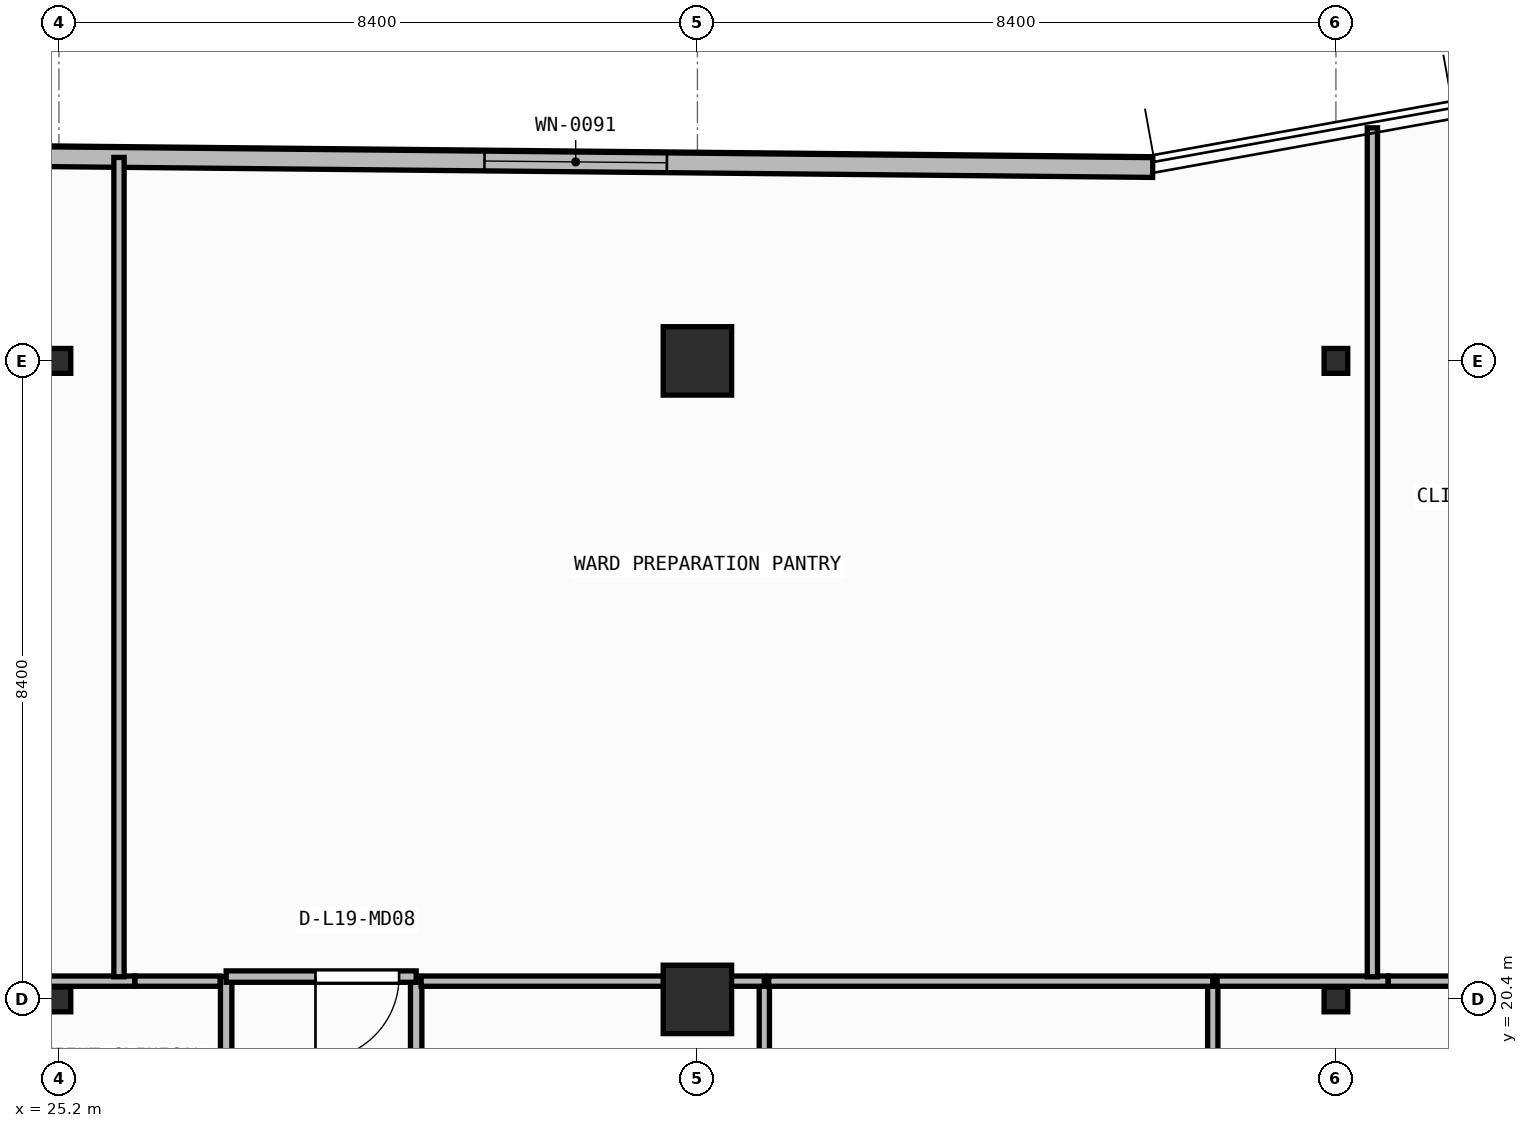
"""IFC4 building model, lengths in metres.
Left out: names, types, materials, properties, quantities, classifications, styles, units other than length and angle.
Written with IfcOpenShell. Run it as: python <this file> out.ifc"""

import sys

from ifc_helpers import new_model, si_unit, direction, frame, frame_2d, origin, origin_2d, place, context, subcontext, project, spatial, rectangle, i_section, extrude, element, fill, save


model = new_model("IFC4")
c1 = context("Model", 3, precision=1e-05, world=origin(), true_north=direction((0.0, 1.0)))
c2 = subcontext(c1, "Body", "Model", "MODEL_VIEW")
j1 = project(units=[si_unit("LENGTHUNIT", "METRE"), si_unit("PLANEANGLEUNIT", "RADIAN")], contexts=[c1])
p1 = place(None, origin())
s1 = spatial("IfcSite", under=j1, at=p1, CompositionType="ELEMENT")
p2 = place(p1, origin())
s2 = spatial("IfcBuilding", under=s1, at=p2, CompositionType="ELEMENT")
p3 = place(p2, frame((0.0, 0.0, 77.8)))
s3 = spatial("IfcBuildingStorey", under=s2, at=p3, CompositionType="ELEMENT", Elevation=77.8)
p4 = place(p3, frame((25.2, 20.4, 0.0), z_axis=(0.0, 0.0, 1.0), x_axis=(1.0, 0.0, 0.0)))
e1 = element("IfcColumn", 1, at=p4, inside=s3, PredefinedType="COLUMN", context=c2, shape_type="SweptSolid", body=[
    extrude(i_section(OverallWidth=0.311, OverallDepth=0.327, WebThickness=0.016, FlangeThickness=0.025, FilletRadius=0.017, at=origin_2d()), origin(), (0.0, 0.0, 1.0), 3.95),
])
p5 = place(p3, frame((33.6, 20.4, 0.0), z_axis=(0.0, 0.0, 1.0), x_axis=(1.0, 0.0, 0.0)))
e2 = element("IfcColumn", 2, at=p5, inside=s3, PredefinedType="COLUMN", context=c2, shape_type="SweptSolid", body=[
    extrude(rectangle(XDim=0.9, YDim=0.9, at=origin_2d()), origin(), (0.0, 0.0, 1.0), 3.95),
])
for number, where, z_axis, x_axis in (
    (3, (42.0, 20.4, 0.0), (0.0, 0.0, 1.0), (1.0, 0.0, 0.0)),
    (4, (25.2, 28.8, 0.0), (0.0, 0.0, 1.0), (1.0, 0.0, 0.0)),
):
    element("IfcColumn", number, at=place(p3, frame(where, z_axis=z_axis, x_axis=x_axis)), inside=s3, PredefinedType="COLUMN", context=c2, shape_type="SweptSolid", body=[
        extrude(i_section(OverallWidth=0.311, OverallDepth=0.327, WebThickness=0.016, FlangeThickness=0.025, FilletRadius=0.017, at=origin_2d()), origin(), (0.0, 0.0, 1.0), 3.95),
    ])
p6 = place(p3, frame((33.6, 28.8, 0.0), z_axis=(0.0, 0.0, 1.0), x_axis=(1.0, 0.0, 0.0)))
e5 = element("IfcColumn", 5, at=p6, inside=s3, PredefinedType="COLUMN", context=c2, shape_type="SweptSolid", body=[
    extrude(rectangle(XDim=0.9, YDim=0.9, at=origin_2d()), origin(), (0.0, 0.0, 1.0), 3.95),
])
p7 = place(p3, frame((42.0, 28.8, 0.0), z_axis=(0.0, 0.0, 1.0), x_axis=(1.0, 0.0, 0.0)))
e6 = element("IfcColumn", 6, at=p7, inside=s3, PredefinedType="COLUMN", context=c2, shape_type="SweptSolid", body=[
    extrude(i_section(OverallWidth=0.311, OverallDepth=0.327, WebThickness=0.016, FlangeThickness=0.025, FilletRadius=0.017, at=origin_2d()), origin(), (0.0, 0.0, 1.0), 3.95),
])
p8 = place(p3, frame((39.59, 31.344, 0.0), z_axis=(0.0, 0.0, 1.0), x_axis=(-0.999952362926, 0.009760731435, 0.0)))
e7 = element("IfcWall", 7, at=p8, inside=s3, PredefinedType="STANDARD", context=c2, shape_type="SweptSolid", body=[
    extrude(rectangle(XDim=15.183, YDim=0.26, at=frame_2d((7.591, 0.0))), origin(), (0.0, 0.0, 1.0), 3.71),
])
p9 = place(p8, frame((6.391, 0.0, 0.9)))
e8 = element("IfcOpeningElement", 8, at=p9, cuts=e7, PredefinedType="OPENING", context=c2, shape_type="SweptSolid", body=[
    extrude(rectangle(XDim=2.4, YDim=1.65, at=frame_2d((1.2, 0.825))), frame((0.0, 0.14, 0.0), z_axis=(0.0, -1.0, 0.0), x_axis=(1.0, 0.0, 0.0)), (0.0, 0.0, 1.0), 0.28),
])
for number, where, z_axis, x_axis in (
    (9, (27.4, 20.7, 0.0), (0.0, 0.0, 1.0), (0.0, -1.0, 0.0)),
    (10, (29.9, 14.7, 0.0), (0.0, 0.0, 1.0), (0.0, 1.0, 0.0)),
):
    element("IfcWall", number, at=place(p3, frame(where, z_axis=z_axis, x_axis=x_axis)), inside=s3, PredefinedType="PARTITIONING", context=c2, shape_type="SweptSolid", body=[
        extrude(rectangle(XDim=6.0, YDim=0.15, at=frame_2d((3.0, 0.0))), origin(), (0.0, 0.0, 1.0), 3.71),
    ])
p10 = place(p3, frame((29.9, 20.7, 0.0), z_axis=(0.0, 0.0, 1.0), x_axis=(-1.0, 0.0, 0.0)))
e11 = element("IfcWall", 11, at=p10, inside=s3, PredefinedType="PARTITIONING", context=c2, shape_type="SweptSolid", body=[
    extrude(rectangle(XDim=2.5, YDim=0.15, at=frame_2d((1.25, 0.0))), origin(), (0.0, 0.0, 1.0), 3.073),
])
p11 = place(p10, frame((0.225, 0.0, 0.0)))
e12 = element("IfcOpeningElement", 12, at=p11, cuts=e11, PredefinedType="OPENING", context=c2, shape_type="SweptSolid", body=[
    extrude(rectangle(XDim=1.1, YDim=2.1, at=frame_2d((0.55, 1.05))), frame((0.0, 0.085, 0.0), z_axis=(0.0, -1.0, 0.0), x_axis=(1.0, 0.0, 0.0)), (0.0, 0.0, 1.0), 0.17),
])
p12 = place(p3, frame((26.198, 20.64, 0.0), z_axis=(0.0, 0.0, 1.0), x_axis=(-1.0, 0.0, 0.0)))
e13 = element("IfcWall", 13, at=p12, inside=s3, PredefinedType="PARTITIONING", context=c2, shape_type="SweptSolid", body=[
    extrude(rectangle(XDim=3.41, YDim=0.135, at=frame_2d((1.705, 0.0))), origin(), (0.0, 0.0, 1.0), 3.073),
])
p13 = place(p3, frame((27.32, 20.64, 0.0), z_axis=(0.0, 0.0, 1.0), x_axis=(-1.0, 0.0, 0.0)))
e14 = element("IfcWall", 14, at=p13, inside=s3, PredefinedType="PARTITIONING", context=c2, shape_type="SweptSolid", body=[
    extrude(rectangle(XDim=1.121, YDim=0.135, at=frame_2d((0.56, 0.0))), origin(), (0.0, 0.0, 1.0), 3.073),
])
p14 = place(p3, frame((34.48, 14.76, 0.0), z_axis=(0.0, 0.0, 1.0), x_axis=(0.0, 1.0, 0.0)))
e15 = element("IfcWall", 15, at=p14, inside=s3, PredefinedType="PARTITIONING", context=c2, shape_type="SweptSolid", body=[
    extrude(rectangle(XDim=5.88, YDim=0.135, at=frame_2d((2.94, 0.0))), origin(), (0.0, 0.0, 1.0), 3.71),
])
p15 = place(p3, frame((34.48, 20.64, 0.0), z_axis=(0.0, 0.0, 1.0), x_axis=(-1.0, 0.0, 0.0)))
e16 = element("IfcWall", 16, at=p15, inside=s3, PredefinedType="PARTITIONING", context=c2, shape_type="SweptSolid", body=[
    extrude(rectangle(XDim=4.515, YDim=0.135, at=frame_2d((2.257, 0.0))), origin(), (0.0, 0.0, 1.0), 3.073),
])
p16 = place(p3, frame((40.38, 14.76, 0.0), z_axis=(0.0, 0.0, 1.0), x_axis=(0.0, 1.0, 0.0)))
e17 = element("IfcWall", 17, at=p16, inside=s3, PredefinedType="PARTITIONING", context=c2, shape_type="SweptSolid", body=[
    extrude(rectangle(XDim=5.88, YDim=0.135, at=frame_2d((2.94, 0.0))), origin(), (0.0, 0.0, 1.0), 3.71),
])
p17 = place(p3, frame((40.38, 20.64, 0.0), z_axis=(0.0, 0.0, 1.0), x_axis=(-1.0, 0.0, 0.0)))
e18 = element("IfcWall", 18, at=p17, inside=s3, PredefinedType="PARTITIONING", context=c2, shape_type="SweptSolid", body=[
    extrude(rectangle(XDim=5.842, YDim=0.135, at=frame_2d((2.921, 0.0))), origin(), (0.0, 0.0, 1.0), 3.073),
])
p18 = place(p3, frame((42.688, 20.64, 0.0), z_axis=(0.0, 0.0, 1.0), x_axis=(-1.0, 0.0, 0.0)))
e19 = element("IfcWall", 19, at=p18, inside=s3, PredefinedType="PARTITIONING", context=c2, shape_type="SweptSolid", body=[
    extrude(rectangle(XDim=2.25, YDim=0.135, at=frame_2d((1.125, 0.0))), origin(), (0.0, 0.0, 1.0), 3.073),
])
p19 = place(p3, frame((48.47, 20.64, 0.0), z_axis=(0.0, 0.0, 1.0), x_axis=(-1.0, 0.0, 0.0)))
e20 = element("IfcWall", 20, at=p19, inside=s3, PredefinedType="PARTITIONING", context=c2, shape_type="SweptSolid", body=[
    extrude(rectangle(XDim=5.781, YDim=0.135, at=frame_2d((2.89, 0.0))), origin(), (0.0, 0.0, 1.0), 3.073),
])
p20 = place(p19, frame((1.912, 0.0, 0.0)))
e21 = element("IfcOpeningElement", 21, at=p20, cuts=e20, PredefinedType="OPENING", context=c2, shape_type="SweptSolid", body=[
    extrude(rectangle(XDim=1.1, YDim=2.1, at=frame_2d((0.55, 1.05))), frame((0.0, 0.077, 0.0), z_axis=(0.0, -1.0, 0.0), x_axis=(1.0, 0.0, 0.0)), (0.0, 0.0, 1.0), 0.155),
])
p21 = place(p3, frame((25.99, 20.698, 0.0), z_axis=(0.0, 0.0, 1.0), x_axis=(0.0, 1.0, 0.0)))
e22 = element("IfcWall", 22, at=p21, inside=s3, PredefinedType="PARTITIONING", context=c2, shape_type="SweptSolid", body=[
    extrude(rectangle(XDim=10.779, YDim=0.135, at=frame_2d((5.39, 0.0))), origin(), (0.0, 0.0, 1.0), 3.71),
])
p22 = place(p3, frame((42.48, 20.698, 0.0), z_axis=(0.0, 0.0, 1.0), x_axis=(0.0, 1.0, 0.0)))
e23 = element("IfcWall", 23, at=p22, inside=s3, PredefinedType="PARTITIONING", context=c2, shape_type="SweptSolid", body=[
    extrude(rectangle(XDim=11.169, YDim=0.135, at=frame_2d((5.584, 0.0))), origin(), (0.0, 0.0, 1.0), 3.073),
])
p23 = place(p9, origin())
e24 = element("IfcWindow", 24, at=p23, inside=s3, PartitioningType="SINGLE_PANEL", PredefinedType="WINDOW", context=c2, shape_type="SweptSolid", body=[
    extrude(rectangle(XDim=2.4, YDim=1.65, at=frame_2d((1.2, 0.825))), frame((0.0, 0.03, 0.0), z_axis=(0.0, -1.0, 0.0), x_axis=(1.0, 0.0, 0.0)), (0.0, 0.0, 1.0), 0.06),
])
fill(e8, e24)
p24 = place(p11, origin())
e25 = element("IfcDoor", 25, at=p24, inside=s3, OperationType="SINGLE_SWING_RIGHT", PredefinedType="DOOR", context=c2, shape_type="SweptSolid", body=[
    extrude(rectangle(XDim=1.1, YDim=2.1, at=frame_2d((0.55, 1.05))), frame((0.0, 0.025, 0.0), z_axis=(0.0, -1.0, 0.0), x_axis=(1.0, 0.0, 0.0)), (0.0, 0.0, 1.0), 0.05),
])
fill(e12, e25)
save(model, sys.argv[1])
